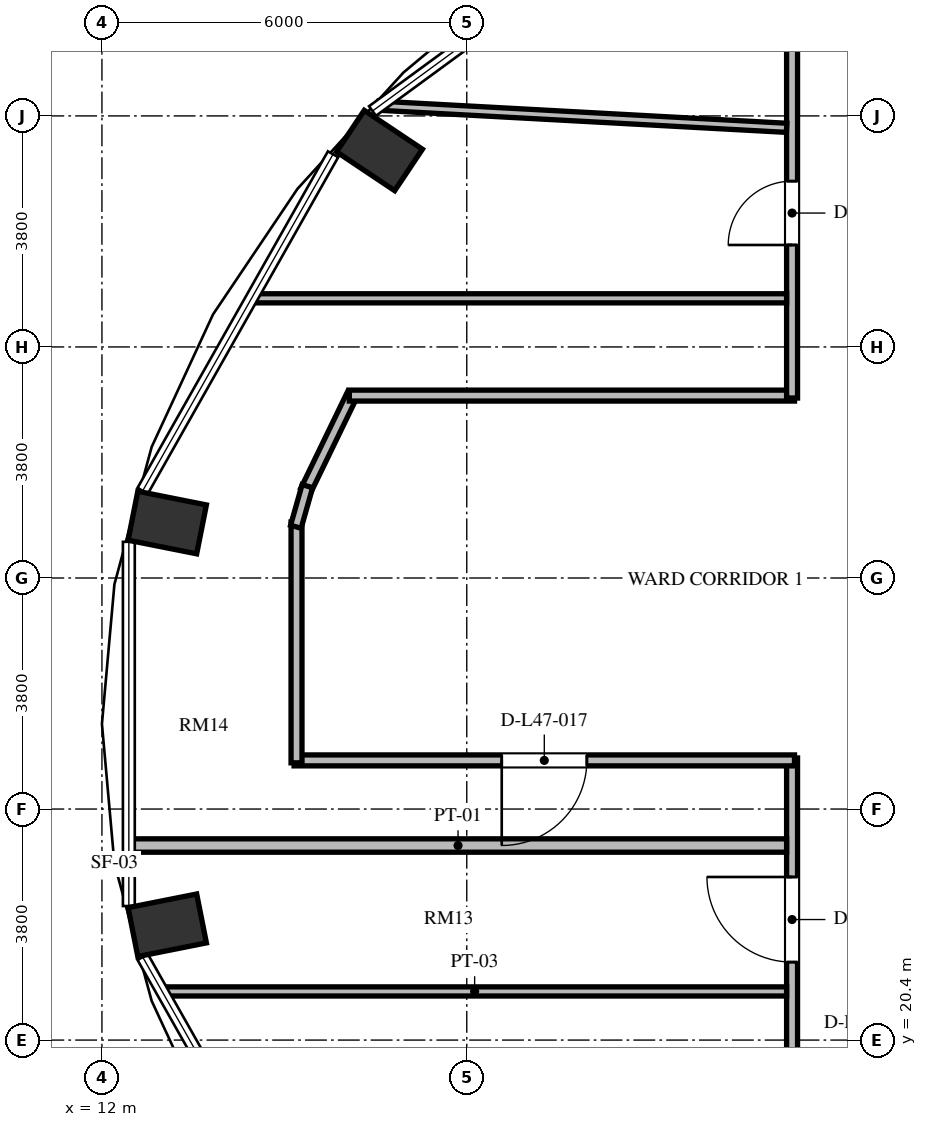
"""IFC4 building model, lengths in metres.
Left out: names, types, materials, properties, quantities, classifications, styles, units other than length and angle.
Written with IfcOpenShell. Run it as: python <this file> out.ifc"""

import sys

from ifc_helpers import new_model, si_unit, direction, frame, frame_2d, origin, origin_2d, place, context, subcontext, project, spatial, rectangle, extrude, element, fill, save


model = new_model("IFC4")
c1 = context("Model", 3, precision=1e-05, world=origin(), true_north=direction((0.0, 1.0)))
c2 = subcontext(c1, "Body", "Model", "MODEL_VIEW")
j1 = project(units=[si_unit("LENGTHUNIT", "METRE"), si_unit("PLANEANGLEUNIT", "RADIAN")], contexts=[c1])
p1 = place(None, origin())
s1 = spatial("IfcSite", under=j1, at=p1, CompositionType="ELEMENT")
p2 = place(p1, origin())
s2 = spatial("IfcBuilding", under=s1, at=p2, CompositionType="ELEMENT")
p3 = place(p2, frame((0.0, 0.0, 182.064)))
s3 = spatial("IfcBuildingStorey", under=s2, at=p3, CompositionType="ELEMENT", Elevation=182.064)
for number, where, z_axis, x_axis in (
    (1, (16.564, 35.031, 0.0), (0.0, 0.0, 1.0), (-0.831, 0.556, 0.0)),
    (2, (13.074, 28.912, 0.0), (0.0, 0.0, 1.0), (-0.981, 0.195, 0.0)),
    (3, (13.074, 22.288, 0.0), (0.0, 0.0, 1.0), (-0.981, -0.195, 0.0)),
):
    element("IfcColumn", number, at=place(p3, frame(where, z_axis=z_axis, x_axis=x_axis)), inside=s3, PredefinedType="COLUMN", context=c2, shape_type="SweptSolid", body=[
        extrude(rectangle(XDim=1.15, YDim=0.82, at=origin_2d()), origin(), (0.0, 0.0, 1.0), 3.648),
    ])
p4 = place(p3, frame((15.35, 29.436, 0.0), z_axis=(0.0, 0.0, 1.0), x_axis=(0.436196025907, 0.899851669434, 0.0)))
e4 = element("IfcWall", 4, at=p4, inside=s3, PredefinedType="PARTITIONING", context=c2, shape_type="SweptSolid", body=[
    extrude(rectangle(XDim=1.778, YDim=0.18, at=frame_2d((0.889, 0.0))), origin(), (0.0, 0.0, 1.0), 3.428),
])
p5 = place(p3, frame((16.068, 31.0, 0.0), z_axis=(0.0, 0.0, 1.0), x_axis=(1.0, 0.0, 0.0)))
e5 = element("IfcWall", 5, at=p5, inside=s3, PredefinedType="PARTITIONING", context=c2, shape_type="SweptSolid", body=[
    extrude(rectangle(XDim=7.322, YDim=0.18, at=frame_2d((3.661, 0.0))), origin(), (0.0, 0.0, 1.0), 3.428),
])
p6 = place(p3, frame((23.35, 30.96, 0.0), z_axis=(0.0, 0.0, 1.0), x_axis=(0.0, 1.0, 0.0)))
e6 = element("IfcWall", 6, at=p6, inside=s3, PredefinedType="PARTITIONING", context=c2, shape_type="SweptSolid", body=[
    extrude(rectangle(XDim=6.714, YDim=0.18, at=frame_2d((3.357, 0.0))), origin(), (0.0, 0.0, 1.0), 3.428),
])
p7 = place(p6, frame((2.517, 0.0, 0.0)))
e7 = element("IfcOpeningElement", 7, at=p7, cuts=e6, PredefinedType="OPENING", context=c2, shape_type="SweptSolid", body=[
    extrude(rectangle(XDim=1.05, YDim=2.15, at=frame_2d((0.525, 1.075))), frame((0.0, 0.1, 0.0), z_axis=(0.0, -1.0, 0.0), x_axis=(1.0, 0.0, 0.0)), (0.0, 0.0, 1.0), 0.2),
])
p8 = place(p3, frame((23.35, 19.98, 0.0), z_axis=(0.0, 0.0, 1.0), x_axis=(0.0, 1.0, 0.0)))
e8 = element("IfcWall", 8, at=p8, inside=s3, PredefinedType="PARTITIONING", context=c2, shape_type="SweptSolid", body=[
    extrude(rectangle(XDim=5.06, YDim=0.18, at=frame_2d((2.53, 0.0))), origin(), (0.0, 0.0, 1.0), 3.428),
])
p9 = place(p8, frame((1.702, 0.0, 0.0)))
e9 = element("IfcOpeningElement", 9, at=p9, cuts=e8, PredefinedType="OPENING", context=c2, shape_type="SweptSolid", body=[
    extrude(rectangle(XDim=1.4, YDim=2.2, at=frame_2d((0.7, 1.1))), frame((0.0, 0.1, 0.0), z_axis=(0.0, -1.0, 0.0), x_axis=(1.0, 0.0, 0.0)), (0.0, 0.0, 1.0), 0.2),
])
p10 = place(p3, frame((23.39, 25.0, 0.0), z_axis=(0.0, 0.0, 1.0), x_axis=(-1.0, 0.0, 0.0)))
e10 = element("IfcWall", 10, at=p10, inside=s3, PredefinedType="PARTITIONING", context=c2, shape_type="SweptSolid", body=[
    extrude(rectangle(XDim=8.23, YDim=0.18, at=frame_2d((4.115, 0.0))), origin(), (0.0, 0.0, 1.0), 3.428),
])
p11 = place(p10, frame((3.415, 0.0, 0.0)))
e11 = element("IfcOpeningElement", 11, at=p11, cuts=e10, PredefinedType="OPENING", context=c2, shape_type="SweptSolid", body=[
    extrude(rectangle(XDim=1.4, YDim=2.2, at=frame_2d((0.7, 1.1))), frame((0.0, 0.1, 0.0), z_axis=(0.0, -1.0, 0.0), x_axis=(1.0, 0.0, 0.0)), (0.0, 0.0, 1.0), 0.2),
])
p12 = place(p3, frame((15.2, 24.96, 0.0), z_axis=(0.0, 0.0, 1.0), x_axis=(0.0, 1.0, 0.0)))
e12 = element("IfcWall", 12, at=p12, inside=s3, PredefinedType="PARTITIONING", context=c2, shape_type="SweptSolid", body=[
    extrude(rectangle(XDim=3.961, YDim=0.18, at=frame_2d((1.98, 0.0))), origin(), (0.0, 0.0, 1.0), 3.428),
])
p13 = place(p3, frame((15.189, 28.843, 0.0), z_axis=(0.0, 0.0, 1.0), x_axis=(0.272862960331, 0.962052911684, 0.0)))
e13 = element("IfcWall", 13, at=p13, inside=s3, PredefinedType="PARTITIONING", context=c2, shape_type="SweptSolid", body=[
    extrude(rectangle(XDim=0.694, YDim=0.18, at=frame_2d((0.347, 0.0))), origin(), (0.0, 0.0, 1.0), 3.428),
])
p14 = place(p3, frame((12.999, 21.2, 0.0), z_axis=(0.0, 0.0, 1.0), x_axis=(1.0, 0.0, 0.0)))
e14 = element("IfcWall", 14, at=p14, inside=s3, PredefinedType="PARTITIONING", context=c2, shape_type="SweptSolid", body=[
    extrude(rectangle(XDim=10.261, YDim=0.15, at=frame_2d((5.131, 0.0))), origin(), (0.0, 0.0, 1.0), 2.863),
])
p15 = place(p3, frame((12.453, 23.6, 0.0), z_axis=(0.0, 0.0, 1.0), x_axis=(1.0, 0.0, 0.0)))
e15 = element("IfcWall", 15, at=p15, inside=s3, PredefinedType="PARTITIONING", context=c2, shape_type="SweptSolid", body=[
    extrude(rectangle(XDim=10.807, YDim=0.22, at=frame_2d((5.404, 0.0))), origin(), (0.0, 0.0, 1.0), 3.428),
])
p16 = place(p3, frame((14.469, 32.6, 0.0), z_axis=(0.0, 0.0, 1.0), x_axis=(1.0, 0.0, 0.0)))
e16 = element("IfcWall", 16, at=p16, inside=s3, PredefinedType="PARTITIONING", context=c2, shape_type="SweptSolid", body=[
    extrude(rectangle(XDim=8.791, YDim=0.15, at=frame_2d((4.396, 0.0))), origin(), (0.0, 0.0, 1.0), 3.428),
])
p17 = place(p3, frame((16.554, 35.768, 0.0), z_axis=(0.0, 0.0, 1.0), x_axis=(0.998529801792, -0.054205488039, 0.0)))
e17 = element("IfcWall", 17, at=p17, inside=s3, PredefinedType="PARTITIONING", context=c2, shape_type="SweptSolid", body=[
    extrude(rectangle(XDim=6.715, YDim=0.15, at=frame_2d((3.358, 0.0))), origin(), (0.0, 0.0, 1.0), 2.863),
])
p18 = place(p9, origin())
e18 = element("IfcDoor", 18, at=p18, inside=s3, OperationType="SINGLE_SWING_RIGHT", PredefinedType="DOOR", context=c2, shape_type="SweptSolid", body=[
    extrude(rectangle(XDim=1.4, YDim=2.2, at=frame_2d((0.7, 1.1))), frame((0.0, 0.025, 0.0), z_axis=(0.0, -1.0, 0.0), x_axis=(1.0, 0.0, 0.0)), (0.0, 0.0, 1.0), 0.05),
])
fill(e9, e18)
p19 = place(p7, origin())
e19 = element("IfcDoor", 19, at=p19, inside=s3, OperationType="SINGLE_SWING_LEFT", PredefinedType="DOOR", context=c2, shape_type="SweptSolid", body=[
    extrude(rectangle(XDim=1.05, YDim=2.15, at=frame_2d((0.525, 1.075))), frame((0.0, 0.025, 0.0), z_axis=(0.0, -1.0, 0.0), x_axis=(1.0, 0.0, 0.0)), (0.0, 0.0, 1.0), 0.05),
])
fill(e7, e19)
p20 = place(p11, origin())
e20 = element("IfcDoor", 20, at=p20, inside=s3, OperationType="SINGLE_SWING_RIGHT", PredefinedType="DOOR", context=c2, shape_type="SweptSolid", body=[
    extrude(rectangle(XDim=1.4, YDim=2.2, at=frame_2d((0.7, 1.1))), frame((0.0, 0.025, 0.0), z_axis=(0.0, -1.0, 0.0), x_axis=(1.0, 0.0, 0.0)), (0.0, 0.0, 1.0), 0.05),
])
fill(e11, e20)
save(model, sys.argv[1])
